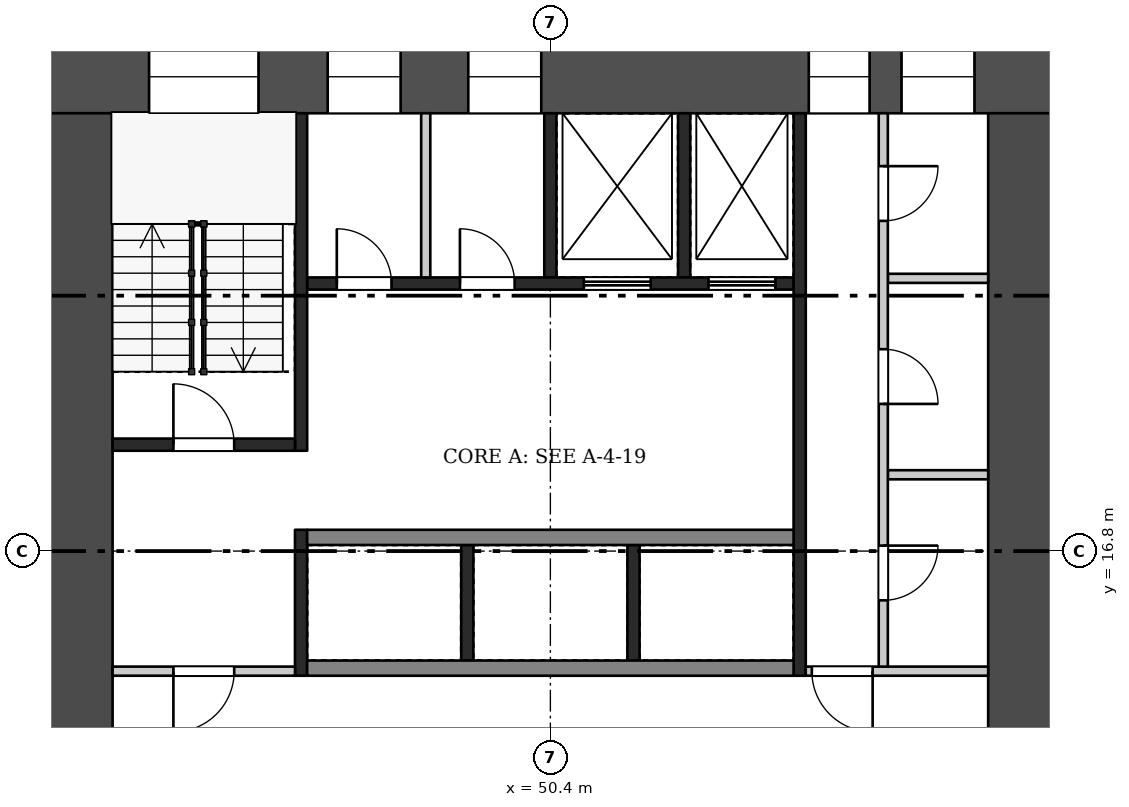
"""IFC4 building model, lengths in metres.
Left out: names, types, materials, properties, quantities, classifications, styles, units other than length and angle.
Written with IfcOpenShell. Run it as: python <this file> out.ifc"""

import sys

from ifc_helpers import new_model, si_unit, direction, frame, frame_2d, origin, place, context, subcontext, project, spatial, rectangle, extrude, element, fill, save


model = new_model("IFC4")
c1 = context("Model", 3, precision=1e-05, world=origin(), true_north=direction((0.0, 1.0)))
c2 = subcontext(c1, "Body", "Model", "MODEL_VIEW")
j1 = project(units=[si_unit("LENGTHUNIT", "METRE"), si_unit("PLANEANGLEUNIT", "RADIAN")], contexts=[c1])
p1 = place(None, origin())
s1 = spatial("IfcSite", under=j1, at=p1, CompositionType="ELEMENT")
p2 = place(p1, origin())
s2 = spatial("IfcBuilding", under=s1, at=p2, CompositionType="ELEMENT")
p3 = place(p2, frame((0.0, 0.0, 119.7)))
s3 = spatial("IfcBuildingStorey", under=s2, at=p3, CompositionType="ELEMENT", Elevation=119.7)
p4 = place(p3, frame((42.0, 24.6, 0.0), z_axis=(0.0, 0.0, 1.0), x_axis=(1.0, 0.0, 0.0)))
e1 = element("IfcWall", 1, at=p4, inside=s3, PredefinedType="SHEAR", context=c2, shape_type="SweptSolid", body=[
    extrude(rectangle(XDim=16.8, YDim=1.2, at=frame_2d((8.4, 0.0))), origin(), (0.0, 0.0, 1.0), 3.22),
])
p5 = place(p4, frame((1.8, 0.0, 0.5)))
e2 = element("IfcOpeningElement", 2, at=p5, cuts=e1, PredefinedType="OPENING", context=c2, shape_type="SweptSolid", body=[
    extrude(rectangle(XDim=1.8, YDim=2.4, at=frame_2d((0.9, 1.2))), frame((0.0, 0.61, 0.0), z_axis=(0.0, -1.0, 0.0), x_axis=(1.0, 0.0, 0.0)), (0.0, 0.0, 1.0), 1.22),
])
p6 = place(p4, frame((4.738, 0.0, 1.6)))
e3 = element("IfcOpeningElement", 3, at=p6, cuts=e1, PredefinedType="OPENING", context=c2, shape_type="SweptSolid", body=[
    extrude(rectangle(XDim=1.2, YDim=1.2, at=frame_2d((0.6, 0.6))), frame((0.0, 0.61, 0.0), z_axis=(0.0, -1.0, 0.0), x_axis=(1.0, 0.0, 0.0)), (0.0, 0.0, 1.0), 1.22),
])
p7 = place(p4, frame((7.05, 0.0, 1.6)))
e4 = element("IfcOpeningElement", 4, at=p7, cuts=e1, PredefinedType="OPENING", context=c2, shape_type="SweptSolid", body=[
    extrude(rectangle(XDim=1.2, YDim=1.2, at=frame_2d((0.6, 0.6))), frame((0.0, 0.61, 0.0), z_axis=(0.0, -1.0, 0.0), x_axis=(1.0, 0.0, 0.0)), (0.0, 0.0, 1.0), 1.22),
])
p8 = place(p4, frame((12.65, 0.0, 0.6)))
e5 = element("IfcOpeningElement", 5, at=p8, cuts=e1, PredefinedType="OPENING", context=c2, shape_type="SweptSolid", body=[
    extrude(rectangle(XDim=1.0, YDim=2.1, at=frame_2d((0.5, 1.05))), frame((0.0, 0.61, 0.0), z_axis=(0.0, -1.0, 0.0), x_axis=(1.0, 0.0, 0.0)), (0.0, 0.0, 1.0), 1.22),
])
p9 = place(p4, frame((14.175, 0.0, 1.6)))
e6 = element("IfcOpeningElement", 6, at=p9, cuts=e1, PredefinedType="OPENING", context=c2, shape_type="SweptSolid", body=[
    extrude(rectangle(XDim=1.2, YDim=1.2, at=frame_2d((0.6, 0.6))), frame((0.0, 0.61, 0.0), z_axis=(0.0, -1.0, 0.0), x_axis=(1.0, 0.0, 0.0)), (0.0, 0.0, 1.0), 1.22),
])
p10 = place(p3, frame((42.6, 9.6, 0.0), z_axis=(0.0, 0.0, 1.0), x_axis=(0.0, 1.0, 0.0)))
e7 = element("IfcWall", 7, at=p10, inside=s3, PredefinedType="SHEAR", context=c2, shape_type="SweptSolid", body=[
    extrude(rectangle(XDim=14.4, YDim=1.2, at=frame_2d((7.2, 0.0))), origin(), (0.0, 0.0, 1.0), 3.22),
])
p11 = place(p10, frame((2.1, 0.0, 0.0)))
e8 = element("IfcOpeningElement", 8, at=p11, cuts=e7, PredefinedType="OPENING", context=c2, shape_type="SweptSolid", body=[
    extrude(rectangle(XDim=1.8, YDim=2.1, at=frame_2d((0.9, 1.05))), frame((0.0, 0.61, 0.0), z_axis=(0.0, -1.0, 0.0), x_axis=(1.0, 0.0, 0.0)), (0.0, 0.0, 1.0), 1.22),
])
p12 = place(p3, frame((58.2, 9.6, 0.0), z_axis=(0.0, 0.0, 1.0), x_axis=(0.0, 1.0, 0.0)))
e9 = element("IfcWall", 9, at=p12, inside=s3, PredefinedType="SHEAR", context=c2, shape_type="SweptSolid", body=[
    extrude(rectangle(XDim=14.4, YDim=1.2, at=frame_2d((7.2, 0.0))), origin(), (0.0, 0.0, 1.0), 3.22),
])
p13 = place(p12, frame((2.1, 0.0, 0.0)))
e10 = element("IfcOpeningElement", 10, at=p13, cuts=e9, PredefinedType="OPENING", context=c2, shape_type="SweptSolid", body=[
    extrude(rectangle(XDim=1.8, YDim=2.1, at=frame_2d((0.9, 1.05))), frame((0.0, 0.61, 0.0), z_axis=(0.0, -1.0, 0.0), x_axis=(1.0, 0.0, 0.0)), (0.0, 0.0, 1.0), 1.22),
])
for number, where, z_axis, x_axis in (
    (11, (49.033, 15.0, 0.0), (0.0, 0.0, 1.0), (0.0, 1.0, 0.0)),
    (12, (51.767, 15.0, 0.0), (0.0, 0.0, 1.0), (0.0, 1.0, 0.0)),
):
    element("IfcWall", number, at=place(p3, frame(where, z_axis=z_axis, x_axis=x_axis)), inside=s3, PredefinedType="SHEAR", context=c2, shape_type="SweptSolid", body=[
        extrude(rectangle(XDim=1.9, YDim=0.2, at=frame_2d((0.95, 0.0))), origin(), (0.0, 0.0, 1.0), 3.22),
    ])
for number, where, z_axis, x_axis in (
    (13, (46.4, 14.875, 0.0), (0.0, 0.0, 1.0), (1.0, 0.0, 0.0)),
    (14, (46.4, 17.025, 0.0), (0.0, 0.0, 1.0), (1.0, 0.0, 0.0)),
):
    element("IfcWall", number, at=place(p3, frame(where, z_axis=z_axis, x_axis=x_axis)), inside=s3, PredefinedType="SHEAR", context=c2, shape_type="SweptSolid", body=[
        extrude(rectangle(XDim=8.0, YDim=0.25, at=frame_2d((4.0, 0.0))), origin(), (0.0, 0.0, 1.0), 3.22),
    ])
for number, where, z_axis, x_axis in (
    (15, (50.4, 21.3, 0.0), (0.0, 0.0, 1.0), (0.0, 1.0, 0.0)),
    (16, (52.6, 21.3, 0.0), (0.0, 0.0, 1.0), (0.0, 1.0, 0.0)),
):
    element("IfcWall", number, at=place(p3, frame(where, z_axis=z_axis, x_axis=x_axis)), inside=s3, PredefinedType="SHEAR", context=c2, shape_type="SweptSolid", body=[
        extrude(rectangle(XDim=2.7, YDim=0.2, at=frame_2d((1.35, 0.0))), origin(), (0.0, 0.0, 1.0), 3.22),
    ])
p14 = place(p3, frame((48.35, 21.3, 0.0), z_axis=(0.0, 0.0, 1.0), x_axis=(0.0, 1.0, 0.0)))
e17 = element("IfcWall", 17, at=p14, inside=s3, PredefinedType="PARTITIONING", context=c2, shape_type="SweptSolid", body=[
    extrude(rectangle(XDim=2.7, YDim=0.15, at=frame_2d((1.35, 0.0))), origin(), (0.0, 0.0, 1.0), 3.22),
])
p15 = place(p3, frame((46.4, 21.2, 0.0), z_axis=(0.0, 0.0, 1.0), x_axis=(1.0, 0.0, 0.0)))
e18 = element("IfcWall", 18, at=p15, inside=s3, PredefinedType="SHEAR", context=c2, shape_type="SweptSolid", body=[
    extrude(rectangle(XDim=8.0, YDim=0.2, at=frame_2d((4.0, 0.0))), origin(), (0.0, 0.0, 1.0), 3.22),
])
p16 = place(p15, frame((0.488, 0.0, 0.0)))
e19 = element("IfcOpeningElement", 19, at=p16, cuts=e18, PredefinedType="OPENING", context=c2, shape_type="SweptSolid", body=[
    extrude(rectangle(XDim=0.9, YDim=2.1, at=frame_2d((0.45, 1.05))), frame((0.0, 0.11, 0.0), z_axis=(0.0, -1.0, 0.0), x_axis=(1.0, 0.0, 0.0)), (0.0, 0.0, 1.0), 0.22),
])
p17 = place(p15, frame((2.512, 0.0, 0.0)))
e20 = element("IfcOpeningElement", 20, at=p17, cuts=e18, PredefinedType="OPENING", context=c2, shape_type="SweptSolid", body=[
    extrude(rectangle(XDim=0.9, YDim=2.1, at=frame_2d((0.45, 1.05))), frame((0.0, 0.11, 0.0), z_axis=(0.0, -1.0, 0.0), x_axis=(1.0, 0.0, 0.0)), (0.0, 0.0, 1.0), 0.22),
])
p18 = place(p15, frame((4.55, 0.0, 0.0)))
e21 = element("IfcOpeningElement", 21, at=p18, cuts=e18, PredefinedType="OPENING", context=c2, shape_type="SweptSolid", body=[
    extrude(rectangle(XDim=1.1, YDim=2.1, at=frame_2d((0.55, 1.05))), frame((0.0, 0.11, 0.0), z_axis=(0.0, -1.0, 0.0), x_axis=(1.0, 0.0, 0.0)), (0.0, 0.0, 1.0), 0.22),
])
p19 = place(p15, frame((6.6, 0.0, 0.0)))
e22 = element("IfcOpeningElement", 22, at=p19, cuts=e18, PredefinedType="OPENING", context=c2, shape_type="SweptSolid", body=[
    extrude(rectangle(XDim=1.1, YDim=2.1, at=frame_2d((0.55, 1.05))), frame((0.0, 0.11, 0.0), z_axis=(0.0, -1.0, 0.0), x_axis=(1.0, 0.0, 0.0)), (0.0, 0.0, 1.0), 0.22),
])
p20 = place(p3, frame((46.3, 14.75, 0.0), z_axis=(0.0, 0.0, 1.0), x_axis=(0.0, 1.0, 0.0)))
e23 = element("IfcWall", 23, at=p20, inside=s3, PredefinedType="SHEAR", context=c2, shape_type="SweptSolid", body=[
    extrude(rectangle(XDim=2.4, YDim=0.2, at=frame_2d((1.2, 0.0))), origin(), (0.0, 0.0, 1.0), 3.22),
])
p21 = place(p3, frame((46.3, 18.45, 0.0), z_axis=(0.0, 0.0, 1.0), x_axis=(0.0, 1.0, 0.0)))
e24 = element("IfcWall", 24, at=p21, inside=s3, PredefinedType="SHEAR", context=c2, shape_type="SweptSolid", body=[
    extrude(rectangle(XDim=5.55, YDim=0.2, at=frame_2d((2.775, 0.0))), origin(), (0.0, 0.0, 1.0), 3.22),
])
p22 = place(p3, frame((43.2, 14.825, 0.0), z_axis=(0.0, 0.0, 1.0), x_axis=(1.0, 0.0, 0.0)))
e25 = element("IfcWall", 25, at=p22, inside=s3, PredefinedType="PARTITIONING", context=c2, shape_type="SweptSolid", body=[
    extrude(rectangle(XDim=3.0, YDim=0.15, at=frame_2d((1.5, 0.0))), origin(), (0.0, 0.0, 1.0), 3.22),
])
p23 = place(p22, frame((1.0, 0.0, 0.0)))
e26 = element("IfcOpeningElement", 26, at=p23, cuts=e25, PredefinedType="OPENING", context=c2, shape_type="SweptSolid", body=[
    extrude(rectangle(XDim=1.0, YDim=2.1, at=frame_2d((0.5, 1.05))), frame((0.0, 0.085, 0.0), z_axis=(0.0, -1.0, 0.0), x_axis=(1.0, 0.0, 0.0)), (0.0, 0.0, 1.0), 0.17),
])
p24 = place(p3, frame((43.2, 18.55, 0.0), z_axis=(0.0, 0.0, 1.0), x_axis=(1.0, 0.0, 0.0)))
e27 = element("IfcWall", 27, at=p24, inside=s3, PredefinedType="SHEAR", context=c2, shape_type="SweptSolid", body=[
    extrude(rectangle(XDim=3.0, YDim=0.2, at=frame_2d((1.5, 0.0))), origin(), (0.0, 0.0, 1.0), 3.22),
])
p25 = place(p24, frame((1.0, 0.0, 0.0)))
e28 = element("IfcOpeningElement", 28, at=p25, cuts=e27, PredefinedType="OPENING", context=c2, shape_type="SweptSolid", body=[
    extrude(rectangle(XDim=1.0, YDim=2.1, at=frame_2d((0.5, 1.05))), frame((0.0, 0.11, 0.0), z_axis=(0.0, -1.0, 0.0), x_axis=(1.0, 0.0, 0.0)), (0.0, 0.0, 1.0), 0.22),
])
p26 = place(p3, frame((54.5, 14.75, 0.0), z_axis=(0.0, 0.0, 1.0), x_axis=(0.0, 1.0, 0.0)))
e29 = element("IfcWall", 29, at=p26, inside=s3, PredefinedType="SHEAR", context=c2, shape_type="SweptSolid", body=[
    extrude(rectangle(XDim=9.25, YDim=0.2, at=frame_2d((4.625, 0.0))), origin(), (0.0, 0.0, 1.0), 3.22),
])
p27 = place(p3, frame((54.6, 14.825, 0.0), z_axis=(0.0, 0.0, 1.0), x_axis=(1.0, 0.0, 0.0)))
e30 = element("IfcWall", 30, at=p27, inside=s3, PredefinedType="PARTITIONING", context=c2, shape_type="SweptSolid", body=[
    extrude(rectangle(XDim=3.0, YDim=0.15, at=frame_2d((1.5, 0.0))), origin(), (0.0, 0.0, 1.0), 3.22),
])
p28 = place(p27, frame((0.1, 0.0, 0.0)))
e31 = element("IfcOpeningElement", 31, at=p28, cuts=e30, PredefinedType="OPENING", context=c2, shape_type="SweptSolid", body=[
    extrude(rectangle(XDim=1.0, YDim=2.1, at=frame_2d((0.5, 1.05))), frame((0.0, 0.085, 0.0), z_axis=(0.0, -1.0, 0.0), x_axis=(1.0, 0.0, 0.0)), (0.0, 0.0, 1.0), 0.17),
])
for number, where, z_axis, x_axis in (
    (32, (55.95, 18.055, 0.0), (0.0, 0.0, 1.0), (1.0, 0.0, 0.0)),
    (33, (55.95, 21.285, 0.0), (0.0, 0.0, 1.0), (1.0, 0.0, 0.0)),
):
    element("IfcWall", number, at=place(p3, frame(where, z_axis=z_axis, x_axis=x_axis)), inside=s3, PredefinedType="PARTITIONING", context=c2, shape_type="SweptSolid", body=[
        extrude(rectangle(XDim=1.65, YDim=0.15, at=frame_2d((0.825, 0.0))), origin(), (0.0, 0.0, 1.0), 3.22),
    ])
p29 = place(p3, frame((55.875, 14.9, 0.0), z_axis=(0.0, 0.0, 1.0), x_axis=(0.0, 1.0, 0.0)))
e34 = element("IfcWall", 34, at=p29, inside=s3, PredefinedType="PARTITIONING", context=c2, shape_type="SweptSolid", body=[
    extrude(rectangle(XDim=9.1, YDim=0.15, at=frame_2d((4.55, 0.0))), origin(), (0.0, 0.0, 1.0), 3.22),
])
p30 = place(p29, frame((1.09, 0.0, 0.0)))
e35 = element("IfcOpeningElement", 35, at=p30, cuts=e34, PredefinedType="OPENING", context=c2, shape_type="SweptSolid", body=[
    extrude(rectangle(XDim=0.9, YDim=2.1, at=frame_2d((0.45, 1.05))), frame((0.0, 0.085, 0.0), z_axis=(0.0, -1.0, 0.0), x_axis=(1.0, 0.0, 0.0)), (0.0, 0.0, 1.0), 0.17),
])
p31 = place(p29, frame((4.32, 0.0, 0.0)))
e36 = element("IfcOpeningElement", 36, at=p31, cuts=e34, PredefinedType="OPENING", context=c2, shape_type="SweptSolid", body=[
    extrude(rectangle(XDim=0.9, YDim=2.1, at=frame_2d((0.45, 1.05))), frame((0.0, 0.085, 0.0), z_axis=(0.0, -1.0, 0.0), x_axis=(1.0, 0.0, 0.0)), (0.0, 0.0, 1.0), 0.17),
])
p32 = place(p29, frame((7.33, 0.0, 0.0)))
e37 = element("IfcOpeningElement", 37, at=p32, cuts=e34, PredefinedType="OPENING", context=c2, shape_type="SweptSolid", body=[
    extrude(rectangle(XDim=0.9, YDim=2.1, at=frame_2d((0.45, 1.05))), frame((0.0, 0.085, 0.0), z_axis=(0.0, -1.0, 0.0), x_axis=(1.0, 0.0, 0.0)), (0.0, 0.0, 1.0), 0.17),
])
p33 = place(p16, origin())
e38 = element("IfcDoor", 38, at=p33, inside=s3, OperationType="SINGLE_SWING_LEFT", PredefinedType="DOOR", context=c2, shape_type="SweptSolid", body=[
    extrude(rectangle(XDim=0.9, YDim=2.1, at=frame_2d((0.45, 1.05))), frame((0.0, 0.025, 0.0), z_axis=(0.0, -1.0, 0.0), x_axis=(1.0, 0.0, 0.0)), (0.0, 0.0, 1.0), 0.05),
])
fill(e19, e38)
p34 = place(p17, origin())
e39 = element("IfcDoor", 39, at=p34, inside=s3, OperationType="SINGLE_SWING_LEFT", PredefinedType="DOOR", context=c2, shape_type="SweptSolid", body=[
    extrude(rectangle(XDim=0.9, YDim=2.1, at=frame_2d((0.45, 1.05))), frame((0.0, 0.025, 0.0), z_axis=(0.0, -1.0, 0.0), x_axis=(1.0, 0.0, 0.0)), (0.0, 0.0, 1.0), 0.05),
])
fill(e20, e39)
p35 = place(p18, origin())
e40 = element("IfcDoor", 40, at=p35, inside=s3, OperationType="DOUBLE_DOOR_SLIDING", PredefinedType="DOOR", context=c2, shape_type="SweptSolid", body=[
    extrude(rectangle(XDim=1.1, YDim=2.1, at=frame_2d((0.55, 1.05))), frame((0.0, 0.025, 0.0), z_axis=(0.0, -1.0, 0.0), x_axis=(1.0, 0.0, 0.0)), (0.0, 0.0, 1.0), 0.05),
])
fill(e21, e40)
p36 = place(p19, origin())
e41 = element("IfcDoor", 41, at=p36, inside=s3, OperationType="DOUBLE_DOOR_SLIDING", PredefinedType="DOOR", context=c2, shape_type="SweptSolid", body=[
    extrude(rectangle(XDim=1.1, YDim=2.1, at=frame_2d((0.55, 1.05))), frame((0.0, 0.025, 0.0), z_axis=(0.0, -1.0, 0.0), x_axis=(1.0, 0.0, 0.0)), (0.0, 0.0, 1.0), 0.05),
])
fill(e22, e41)
p37 = place(p23, frame((1.0, 0.0, 0.0), z_axis=(0.0, 0.0, 1.0), x_axis=(-1.0, 0.0, 0.0)))
e42 = element("IfcDoor", 42, at=p37, inside=s3, OperationType="SINGLE_SWING_RIGHT", PredefinedType="DOOR", context=c2, shape_type="SweptSolid", body=[
    extrude(rectangle(XDim=1.0, YDim=2.1, at=frame_2d((0.5, 1.05))), frame((0.0, 0.025, 0.0), z_axis=(0.0, -1.0, 0.0), x_axis=(1.0, 0.0, 0.0)), (0.0, 0.0, 1.0), 0.05),
])
fill(e26, e42)
p38 = place(p25, origin())
e43 = element("IfcDoor", 43, at=p38, inside=s3, OperationType="SINGLE_SWING_LEFT", PredefinedType="DOOR", context=c2, shape_type="SweptSolid", body=[
    extrude(rectangle(XDim=1.0, YDim=2.1, at=frame_2d((0.5, 1.05))), frame((0.0, 0.025, 0.0), z_axis=(0.0, -1.0, 0.0), x_axis=(1.0, 0.0, 0.0)), (0.0, 0.0, 1.0), 0.05),
])
fill(e28, e43)
p39 = place(p28, frame((1.0, 0.0, 0.0), z_axis=(0.0, 0.0, 1.0), x_axis=(-1.0, 0.0, 0.0)))
e44 = element("IfcDoor", 44, at=p39, inside=s3, OperationType="SINGLE_SWING_LEFT", PredefinedType="DOOR", context=c2, shape_type="SweptSolid", body=[
    extrude(rectangle(XDim=1.0, YDim=2.1, at=frame_2d((0.5, 1.05))), frame((0.0, 0.025, 0.0), z_axis=(0.0, -1.0, 0.0), x_axis=(1.0, 0.0, 0.0)), (0.0, 0.0, 1.0), 0.05),
])
fill(e31, e44)
p40 = place(p30, frame((0.9, 0.0, 0.0), z_axis=(0.0, 0.0, 1.0), x_axis=(-1.0, 0.0, 0.0)))
e45 = element("IfcDoor", 45, at=p40, inside=s3, OperationType="SINGLE_SWING_LEFT", PredefinedType="DOOR", context=c2, shape_type="SweptSolid", body=[
    extrude(rectangle(XDim=0.9, YDim=2.1, at=frame_2d((0.45, 1.05))), frame((0.0, 0.025, 0.0), z_axis=(0.0, -1.0, 0.0), x_axis=(1.0, 0.0, 0.0)), (0.0, 0.0, 1.0), 0.05),
])
fill(e35, e45)
p41 = place(p31, frame((0.9, 0.0, 0.0), z_axis=(0.0, 0.0, 1.0), x_axis=(-1.0, 0.0, 0.0)))
e46 = element("IfcDoor", 46, at=p41, inside=s3, OperationType="SINGLE_SWING_RIGHT", PredefinedType="DOOR", context=c2, shape_type="SweptSolid", body=[
    extrude(rectangle(XDim=0.9, YDim=2.1, at=frame_2d((0.45, 1.05))), frame((0.0, 0.025, 0.0), z_axis=(0.0, -1.0, 0.0), x_axis=(1.0, 0.0, 0.0)), (0.0, 0.0, 1.0), 0.05),
])
fill(e36, e46)
p42 = place(p32, frame((0.9, 0.0, 0.0), z_axis=(0.0, 0.0, 1.0), x_axis=(-1.0, 0.0, 0.0)))
e47 = element("IfcDoor", 47, at=p42, inside=s3, OperationType="SINGLE_SWING_LEFT", PredefinedType="DOOR", context=c2, shape_type="SweptSolid", body=[
    extrude(rectangle(XDim=0.9, YDim=2.1, at=frame_2d((0.45, 1.05))), frame((0.0, 0.025, 0.0), z_axis=(0.0, -1.0, 0.0), x_axis=(1.0, 0.0, 0.0)), (0.0, 0.0, 1.0), 0.05),
])
fill(e37, e47)
p43 = place(p5, origin())
e48 = element("IfcWindow", 48, at=p43, inside=s3, PartitioningType="SINGLE_PANEL", PredefinedType="WINDOW", context=c2, shape_type="SweptSolid", body=[
    extrude(rectangle(XDim=1.8, YDim=2.4, at=frame_2d((0.9, 1.2))), frame((0.0, 0.03, 0.0), z_axis=(0.0, -1.0, 0.0), x_axis=(1.0, 0.0, 0.0)), (0.0, 0.0, 1.0), 0.06),
])
fill(e2, e48)
p44 = place(p6, origin())
e49 = element("IfcWindow", 49, at=p44, inside=s3, PartitioningType="SINGLE_PANEL", PredefinedType="WINDOW", context=c2, shape_type="SweptSolid", body=[
    extrude(rectangle(XDim=1.2, YDim=1.2, at=frame_2d((0.6, 0.6))), frame((0.0, 0.03, 0.0), z_axis=(0.0, -1.0, 0.0), x_axis=(1.0, 0.0, 0.0)), (0.0, 0.0, 1.0), 0.06),
])
fill(e3, e49)
p45 = place(p7, origin())
e50 = element("IfcWindow", 50, at=p45, inside=s3, PartitioningType="SINGLE_PANEL", PredefinedType="WINDOW", context=c2, shape_type="SweptSolid", body=[
    extrude(rectangle(XDim=1.2, YDim=1.2, at=frame_2d((0.6, 0.6))), frame((0.0, 0.03, 0.0), z_axis=(0.0, -1.0, 0.0), x_axis=(1.0, 0.0, 0.0)), (0.0, 0.0, 1.0), 0.06),
])
fill(e4, e50)
p46 = place(p8, origin())
e51 = element("IfcWindow", 51, at=p46, inside=s3, PartitioningType="SINGLE_PANEL", PredefinedType="WINDOW", context=c2, shape_type="SweptSolid", body=[
    extrude(rectangle(XDim=1.0, YDim=2.1, at=frame_2d((0.5, 1.05))), frame((0.0, 0.03, 0.0), z_axis=(0.0, -1.0, 0.0), x_axis=(1.0, 0.0, 0.0)), (0.0, 0.0, 1.0), 0.06),
])
fill(e5, e51)
p47 = place(p9, origin())
e52 = element("IfcWindow", 52, at=p47, inside=s3, PartitioningType="SINGLE_PANEL", PredefinedType="WINDOW", context=c2, shape_type="SweptSolid", body=[
    extrude(rectangle(XDim=1.2, YDim=1.2, at=frame_2d((0.6, 0.6))), frame((0.0, 0.03, 0.0), z_axis=(0.0, -1.0, 0.0), x_axis=(1.0, 0.0, 0.0)), (0.0, 0.0, 1.0), 0.06),
])
fill(e6, e52)
save(model, sys.argv[1])
